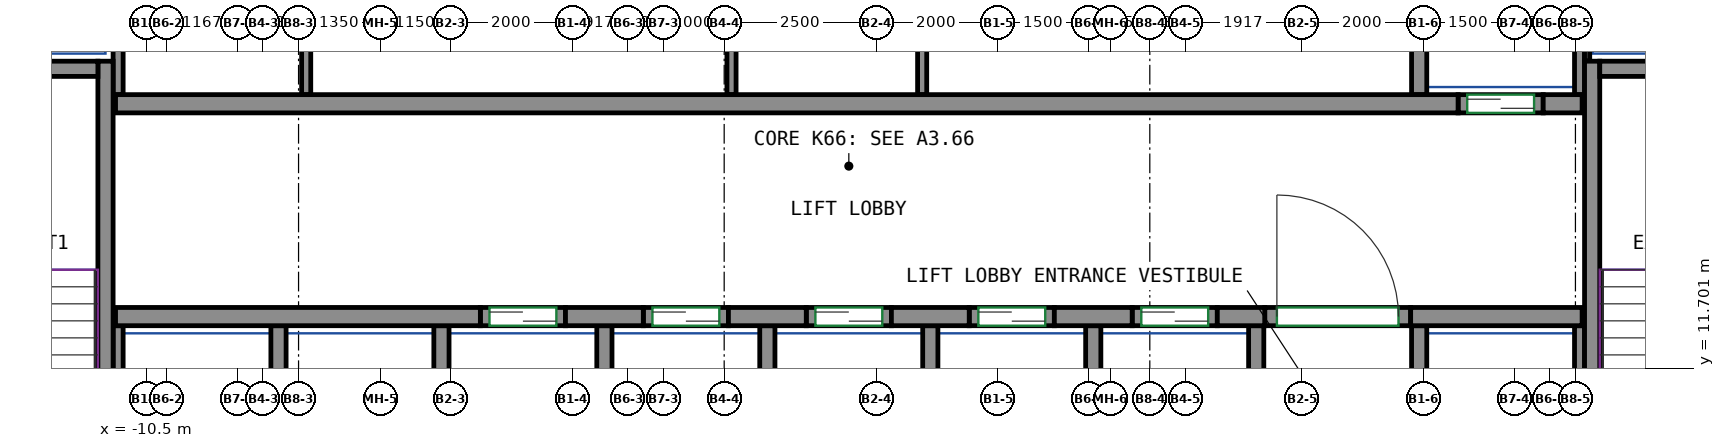
"""IFC4 building model, lengths in metres.
Left out: names, types, materials, properties, quantities, classifications, styles, units other than length and angle.
Written with IfcOpenShell. Run it as: python <this file> out.ifc"""

import sys

from ifc_helpers import new_model, si_unit, direction, frame, frame_2d, origin, place, context, subcontext, project, spatial, rectangle, extrude, source, transform, mapped, element, fill, save


model = new_model("IFC4")
c1 = context("Model", 3, precision=1e-05, world=origin(), true_north=direction((0.0, 1.0)))
c2 = subcontext(c1, "Body", "Model", "MODEL_VIEW")
j1 = project(units=[si_unit("LENGTHUNIT", "METRE"), si_unit("PLANEANGLEUNIT", "RADIAN")], contexts=[c1])
p1 = place(None, origin())
s1 = spatial("IfcSite", under=j1, at=p1, CompositionType="ELEMENT")
p2 = place(p1, origin())
s2 = spatial("IfcBuilding", under=s1, at=p2, CompositionType="ELEMENT")
p3 = place(p2, frame((0.0, 0.0, 267.0)))
s3 = spatial("IfcBuildingStorey", under=s2, at=p3, CompositionType="ELEMENT", Elevation=267.0)
m1 = source(origin(), c2, "Body", "SweptSolid", [
    extrude(rectangle(XDim=7.75, YDim=0.25, at=frame_2d((3.875, 0.0))), origin(), (0.0, 0.0, 1.0), 3.12),
])
p4 = place(p3, frame((-11.175, 9.0, 0.0), z_axis=(0.0, 0.0, 1.0), x_axis=(0.0, 1.0, 0.0)))
e1 = element("IfcWall", 1, at=p4, inside=s3, PredefinedType="SHEAR", context=c2, shape_type="MappedRepresentation", body=[
    mapped(m1, transform((0.0, 0.0, 0.0))),
])
m2 = source(origin(), c2, "Body", "SweptSolid", [
    extrude(rectangle(XDim=3.7, YDim=0.25, at=frame_2d((1.85, 0.0))), origin(), (0.0, 0.0, 1.0), 3.12),
])
p5 = place(p3, frame((-15.0, 16.625, 0.0), z_axis=(0.0, 0.0, 1.0), x_axis=(1.0, 0.0, 0.0)))
e2 = element("IfcWall", 2, at=p5, inside=s3, PredefinedType="SHEAR", context=c2, shape_type="MappedRepresentation", body=[
    mapped(m2, transform((0.0, 0.0, 0.0))),
])
p6 = place(p3, frame((13.275, 9.0, 0.0), z_axis=(0.0, 0.0, 1.0), x_axis=(0.0, 1.0, 0.0)))
e3 = element("IfcWall", 3, at=p6, inside=s3, PredefinedType="SHEAR", context=c2, shape_type="MappedRepresentation", body=[
    mapped(m1, transform((0.0, 0.0, 0.0))),
])
m3 = source(origin(), c2, "Body", "SweptSolid", [
    extrude(rectangle(XDim=3.7, YDim=0.25, at=frame_2d((1.85, 0.0))), origin(), (0.0, 0.0, 1.0), 3.12),
])
p7 = place(p3, frame((13.4, 16.625, 0.0), z_axis=(0.0, 0.0, 1.0), x_axis=(1.0, 0.0, 0.0)))
e4 = element("IfcWall", 4, at=p7, inside=s3, PredefinedType="SHEAR", context=c2, shape_type="MappedRepresentation", body=[
    mapped(m3, transform((0.0, 0.0, 0.0))),
])
m4 = source(origin(), c2, "Body", "SweptSolid", [
    extrude(rectangle(XDim=6.0, YDim=0.3, at=frame_2d((3.0, 0.0))), origin(), (0.0, 0.0, 1.0), 3.12),
])
p8 = place(p3, frame((-11.01, 12.55, 0.0), z_axis=(0.0, 0.0, 1.0), x_axis=(1.0, 0.0, 0.0)))
e5 = element("IfcWall", 5, at=p8, inside=s3, PredefinedType="SHEAR", context=c2, shape_type="MappedRepresentation", body=[
    mapped(m4, transform((0.0, 0.0, 0.0))),
])
m5 = source(origin(), c2, "Body", "SweptSolid", [
    extrude(rectangle(XDim=1.28, YDim=0.3, at=frame_2d((0.64, 0.0))), origin(), (0.0, 0.0, 1.0), 3.12),
])
for number, where, z_axis, x_axis in (
    (6, (-3.61, 12.55, 0.0), (0.0, 0.0, 1.0), (1.0, 0.0, 0.0)),
    (7, (-0.93, 12.55, 0.0), (0.0, 0.0, 1.0), (1.0, 0.0, 0.0)),
    (8, (1.75, 12.55, 0.0), (0.0, 0.0, 1.0), (1.0, 0.0, 0.0)),
    (9, (4.43, 12.55, 0.0), (0.0, 0.0, 1.0), (1.0, 0.0, 0.0)),
):
    element("IfcWall", number, at=place(p3, frame(where, z_axis=z_axis, x_axis=x_axis)), inside=s3, PredefinedType="SHEAR", context=c2, shape_type="MappedRepresentation", body=[
        mapped(m5, transform((0.0, 0.0, 0.0))),
    ])
m6 = source(origin(), c2, "Body", "SweptSolid", [
    extrude(rectangle(XDim=0.78, YDim=0.3, at=frame_2d((0.39, 0.0))), origin(), (0.0, 0.0, 1.0), 3.12),
])
p9 = place(p3, frame((7.11, 12.55, 0.0), z_axis=(0.0, 0.0, 1.0), x_axis=(1.0, 0.0, 0.0)))
e10 = element("IfcWall", 10, at=p9, inside=s3, PredefinedType="SHEAR", context=c2, shape_type="MappedRepresentation", body=[
    mapped(m6, transform((0.0, 0.0, 0.0))),
])
m7 = source(origin(), c2, "Body", "SweptSolid", [
    extrude(rectangle(XDim=2.82, YDim=0.3, at=frame_2d((1.41, 0.0))), origin(), (0.0, 0.0, 1.0), 3.12),
])
p10 = place(p3, frame((10.29, 12.55, 0.0), z_axis=(0.0, 0.0, 1.0), x_axis=(1.0, 0.0, 0.0)))
e11 = element("IfcWall", 11, at=p10, inside=s3, PredefinedType="SHEAR", context=c2, shape_type="MappedRepresentation", body=[
    mapped(m7, transform((0.0, 0.0, 0.0))),
])
m8 = source(origin(), c2, "Body", "SweptSolid", [
    extrude(rectangle(XDim=22.08, YDim=0.3, at=frame_2d((11.04, 0.0))), origin(), (0.0, 0.0, 1.0), 3.12),
])
p11 = place(p3, frame((-11.01, 16.05, 0.0), z_axis=(0.0, 0.0, 1.0), x_axis=(1.0, 0.0, 0.0)))
e12 = element("IfcWall", 12, at=p11, inside=s3, PredefinedType="SHEAR", context=c2, shape_type="MappedRepresentation", body=[
    mapped(m8, transform((0.0, 0.0, 0.0))),
])
m9 = source(origin(), c2, "Body", "SweptSolid", [
    extrude(rectangle(XDim=0.64, YDim=0.3, at=frame_2d((0.32, 0.0))), origin(), (0.0, 0.0, 1.0), 3.12),
])
p12 = place(p3, frame((12.47, 16.05, 0.0), z_axis=(0.0, 0.0, 1.0), x_axis=(1.0, 0.0, 0.0)))
e13 = element("IfcWall", 13, at=p12, inside=s3, PredefinedType="SHEAR", context=c2, shape_type="MappedRepresentation", body=[
    mapped(m9, transform((0.0, 0.0, 0.0))),
])
m10 = source(origin(), c2, "Body", "SweptSolid", [
    extrude(rectangle(XDim=1.4, YDim=0.3, at=frame_2d((0.7, 0.0))), origin(), (0.0, 0.0, 1.0), 3.12),
])
p13 = place(p3, frame((-5.01, 12.55, 0.0), z_axis=(0.0, 0.0, 1.0), x_axis=(1.0, 0.0, 0.0)))
e14 = element("IfcWall", 14, at=p13, inside=s3, PredefinedType="PARTITIONING", context=c2, shape_type="MappedRepresentation", body=[
    mapped(m10, transform((0.0, 0.0, 0.0))),
])
p14 = place(p13, frame((0.15, 0.0, 0.0)))
e15 = element("IfcOpeningElement", 15, at=p14, cuts=e14, PredefinedType="OPENING", context=c2, shape_type="SweptSolid", body=[
    extrude(rectangle(XDim=1.1, YDim=2.1, at=frame_2d((0.55, 1.05))), frame((0.0, 0.16, 0.0), z_axis=(0.0, -1.0, 0.0), x_axis=(1.0, 0.0, 0.0)), (0.0, 0.0, 1.0), 0.32),
])
m11 = source(origin(), c2, "Body", "SweptSolid", [
    extrude(rectangle(XDim=1.4, YDim=0.3, at=frame_2d((0.7, 0.0))), origin(), (0.0, 0.0, 1.0), 3.12),
])
p15 = place(p3, frame((-2.33, 12.55, 0.0), z_axis=(0.0, 0.0, 1.0), x_axis=(1.0, 0.0, 0.0)))
e16 = element("IfcWall", 16, at=p15, inside=s3, PredefinedType="PARTITIONING", context=c2, shape_type="MappedRepresentation", body=[
    mapped(m11, transform((0.0, 0.0, 0.0))),
])
p16 = place(p15, frame((0.15, 0.0, 0.0)))
e17 = element("IfcOpeningElement", 17, at=p16, cuts=e16, PredefinedType="OPENING", context=c2, shape_type="SweptSolid", body=[
    extrude(rectangle(XDim=1.1, YDim=2.1, at=frame_2d((0.55, 1.05))), frame((0.0, 0.16, 0.0), z_axis=(0.0, -1.0, 0.0), x_axis=(1.0, 0.0, 0.0)), (0.0, 0.0, 1.0), 0.32),
])
p17 = place(p3, frame((0.35, 12.55, 0.0), z_axis=(0.0, 0.0, 1.0), x_axis=(1.0, 0.0, 0.0)))
e18 = element("IfcWall", 18, at=p17, inside=s3, PredefinedType="PARTITIONING", context=c2, shape_type="MappedRepresentation", body=[
    mapped(m10, transform((0.0, 0.0, 0.0))),
])
p18 = place(p17, frame((0.15, 0.0, 0.0)))
e19 = element("IfcOpeningElement", 19, at=p18, cuts=e18, PredefinedType="OPENING", context=c2, shape_type="SweptSolid", body=[
    extrude(rectangle(XDim=1.1, YDim=2.1, at=frame_2d((0.55, 1.05))), frame((0.0, 0.16, 0.0), z_axis=(0.0, -1.0, 0.0), x_axis=(1.0, 0.0, 0.0)), (0.0, 0.0, 1.0), 0.32),
])
p19 = place(p3, frame((3.03, 12.55, 0.0), z_axis=(0.0, 0.0, 1.0), x_axis=(1.0, 0.0, 0.0)))
e20 = element("IfcWall", 20, at=p19, inside=s3, PredefinedType="PARTITIONING", context=c2, shape_type="MappedRepresentation", body=[
    mapped(m10, transform((0.0, 0.0, 0.0))),
])
p20 = place(p19, frame((0.15, 0.0, 0.0)))
e21 = element("IfcOpeningElement", 21, at=p20, cuts=e20, PredefinedType="OPENING", context=c2, shape_type="SweptSolid", body=[
    extrude(rectangle(XDim=1.1, YDim=2.1, at=frame_2d((0.55, 1.05))), frame((0.0, 0.16, 0.0), z_axis=(0.0, -1.0, 0.0), x_axis=(1.0, 0.0, 0.0)), (0.0, 0.0, 1.0), 0.32),
])
p21 = place(p3, frame((5.71, 12.55, 0.0), z_axis=(0.0, 0.0, 1.0), x_axis=(1.0, 0.0, 0.0)))
e22 = element("IfcWall", 22, at=p21, inside=s3, PredefinedType="PARTITIONING", context=c2, shape_type="MappedRepresentation", body=[
    mapped(m11, transform((0.0, 0.0, 0.0))),
])
p22 = place(p21, frame((0.15, 0.0, 0.0)))
e23 = element("IfcOpeningElement", 23, at=p22, cuts=e22, PredefinedType="OPENING", context=c2, shape_type="SweptSolid", body=[
    extrude(rectangle(XDim=1.1, YDim=2.1, at=frame_2d((0.55, 1.05))), frame((0.0, 0.16, 0.0), z_axis=(0.0, -1.0, 0.0), x_axis=(1.0, 0.0, 0.0)), (0.0, 0.0, 1.0), 0.32),
])
p23 = place(p3, frame((11.07, 16.05, 0.0), z_axis=(0.0, 0.0, 1.0), x_axis=(1.0, 0.0, 0.0)))
e24 = element("IfcWall", 24, at=p23, inside=s3, PredefinedType="PARTITIONING", context=c2, shape_type="MappedRepresentation", body=[
    mapped(m10, transform((0.0, 0.0, 0.0))),
])
p24 = place(p23, frame((0.15, 0.0, 0.0)))
e25 = element("IfcOpeningElement", 25, at=p24, cuts=e24, PredefinedType="OPENING", context=c2, shape_type="SweptSolid", body=[
    extrude(rectangle(XDim=1.1, YDim=2.1, at=frame_2d((0.55, 1.05))), frame((0.0, 0.16, 0.0), z_axis=(0.0, -1.0, 0.0), x_axis=(1.0, 0.0, 0.0)), (0.0, 0.0, 1.0), 0.32),
])
m12 = source(origin(), c2, "Body", "SweptSolid", [
    extrude(rectangle(XDim=2.4, YDim=0.3, at=frame_2d((1.2, 0.0))), origin(), (0.0, 0.0, 1.0), 3.12),
])
p25 = place(p3, frame((7.89, 12.55, 0.0), z_axis=(0.0, 0.0, 1.0), x_axis=(1.0, 0.0, 0.0)))
e26 = element("IfcWall", 26, at=p25, inside=s3, PredefinedType="PARTITIONING", context=c2, shape_type="MappedRepresentation", body=[
    mapped(m12, transform((0.0, 0.0, 0.0))),
])
p26 = place(p25, frame((0.2, 0.0, 0.0)))
e27 = element("IfcOpeningElement", 27, at=p26, cuts=e26, PredefinedType="OPENING", context=c2, shape_type="SweptSolid", body=[
    extrude(rectangle(XDim=2.0, YDim=2.1, at=frame_2d((1.0, 1.05))), frame((0.0, 0.16, 0.0), z_axis=(0.0, -1.0, 0.0), x_axis=(1.0, 0.0, 0.0)), (0.0, 0.0, 1.0), 0.32),
])
m13 = source(origin(), c2, "Body", "SweptSolid", [
    extrude(rectangle(XDim=3.275, YDim=0.165, at=frame_2d((1.638, 0.0))), origin(), (0.0, 0.0, 1.0), 3.12),
])
p27 = place(p3, frame((13.067, 16.2, 0.0), z_axis=(0.0, 0.0, 1.0), x_axis=(0.0, 1.0, 0.0)))
e28 = element("IfcWall", 28, at=p27, inside=s3, PredefinedType="PARTITIONING", context=c2, shape_type="MappedRepresentation", body=[
    mapped(m13, transform((0.0, 0.0, 0.0))),
])
m14 = source(origin(), c2, "Body", "SweptSolid", [
    extrude(rectangle(XDim=4.8, YDim=0.165, at=frame_2d((2.4, 0.0))), origin(), (0.0, 0.0, 1.0), 3.12),
])
p28 = place(p3, frame((-10.968, 16.2, 0.0), z_axis=(0.0, 0.0, 1.0), x_axis=(0.0, 1.0, 0.0)))
e29 = element("IfcWall", 29, at=p28, inside=s3, PredefinedType="PARTITIONING", context=c2, shape_type="MappedRepresentation", body=[
    mapped(m14, transform((0.0, 0.0, 0.0))),
])
m15 = source(origin(), c2, "Body", "SweptSolid", [
    extrude(rectangle(XDim=3.275, YDim=0.25, at=frame_2d((1.638, 0.0))), origin(), (0.0, 0.0, 1.0), 3.12),
])
p29 = place(p3, frame((10.43, 16.2, 0.0), z_axis=(0.0, 0.0, 1.0), x_axis=(0.0, 1.0, 0.0)))
e30 = element("IfcWall", 30, at=p29, inside=s3, PredefinedType="PARTITIONING", context=c2, shape_type="MappedRepresentation", body=[
    mapped(m15, transform((0.0, 0.0, 0.0))),
])
m16 = source(origin(), c2, "Body", "SweptSolid", [
    extrude(rectangle(XDim=2.725, YDim=0.085, at=frame_2d((1.363, 0.0))), origin(), (0.0, 0.0, 1.0), 3.12),
])
p30 = place(p3, frame((13.192, 16.75, 0.0), z_axis=(0.0, 0.0, 1.0), x_axis=(0.0, 1.0, 0.0)))
e31 = element("IfcWall", 31, at=p30, inside=s3, PredefinedType="PARTITIONING", context=c2, shape_type="MappedRepresentation", body=[
    mapped(m16, transform((0.0, 0.0, 0.0))),
])
m17 = source(origin(), c2, "Body", "SweptSolid", [
    extrude(rectangle(XDim=3.4, YDim=0.25, at=frame_2d((1.7, 0.0))), origin(), (0.0, 0.0, 1.0), 3.12),
])
p31 = place(p3, frame((10.43, 9.0, 0.0), z_axis=(0.0, 0.0, 1.0), x_axis=(0.0, 1.0, 0.0)))
e32 = element("IfcWall", 32, at=p31, inside=s3, PredefinedType="PARTITIONING", context=c2, shape_type="MappedRepresentation", body=[
    mapped(m17, transform((0.0, 0.0, 0.0))),
])
m18 = source(origin(), c2, "Body", "SweptSolid", [
    extrude(rectangle(XDim=3.4, YDim=0.165, at=frame_2d((1.7, 0.0))), origin(), (0.0, 0.0, 1.0), 3.12),
])
p32 = place(p3, frame((13.067, 9.0, 0.0), z_axis=(0.0, 0.0, 1.0), x_axis=(0.0, 1.0, 0.0)))
e33 = element("IfcWall", 33, at=p32, inside=s3, PredefinedType="PARTITIONING", context=c2, shape_type="MappedRepresentation", body=[
    mapped(m18, transform((0.0, 0.0, 0.0))),
])
for number, where, z_axis, x_axis in (
    (34, (2.39, 9.0, 0.0), (0.0, 0.0, 1.0), (0.0, 1.0, 0.0)),
    (35, (5.07, 9.0, 0.0), (0.0, 0.0, 1.0), (0.0, 1.0, 0.0)),
    (36, (7.75, 9.0, 0.0), (0.0, 0.0, 1.0), (0.0, 1.0, 0.0)),
    (37, (-0.29, 9.0, 0.0), (0.0, 0.0, 1.0), (0.0, 1.0, 0.0)),
):
    element("IfcWall", number, at=place(p3, frame(where, z_axis=z_axis, x_axis=x_axis)), inside=s3, PredefinedType="PARTITIONING", context=c2, shape_type="MappedRepresentation", body=[
        mapped(m17, transform((0.0, 0.0, 0.0))),
    ])
p33 = place(p3, frame((-10.968, 9.0, 0.0), z_axis=(0.0, 0.0, 1.0), x_axis=(0.0, 1.0, 0.0)))
e38 = element("IfcWall", 38, at=p33, inside=s3, PredefinedType="PARTITIONING", context=c2, shape_type="MappedRepresentation", body=[
    mapped(m18, transform((0.0, 0.0, 0.0))),
])
for number, where, z_axis, x_axis in (
    (39, (-2.97, 9.0, 0.0), (0.0, 0.0, 1.0), (0.0, 1.0, 0.0)),
    (40, (-5.65, 9.0, 0.0), (0.0, 0.0, 1.0), (0.0, 1.0, 0.0)),
    (41, (-8.33, 9.0, 0.0), (0.0, 0.0, 1.0), (0.0, 1.0, 0.0)),
):
    element("IfcWall", number, at=place(p3, frame(where, z_axis=z_axis, x_axis=x_axis)), inside=s3, PredefinedType="PARTITIONING", context=c2, shape_type="MappedRepresentation", body=[
        mapped(m17, transform((0.0, 0.0, 0.0))),
    ])
m19 = source(origin(), c2, "Body", "SweptSolid", [
    extrude(rectangle(XDim=4.8, YDim=0.15, at=frame_2d((2.4, 0.0))), origin(), (0.0, 0.0, 1.0), 3.12),
])
for number, where, z_axis, x_axis in (
    (42, (-7.875, 16.2, 0.0), (0.0, 0.0, 1.0), (0.0, 1.0, 0.0)),
    (43, (-0.88, 16.2, 0.0), (0.0, 0.0, 1.0), (0.0, 1.0, 0.0)),
    (44, (2.256, 16.2, 0.0), (0.0, 0.0, 1.0), (0.0, 1.0, 0.0)),
):
    element("IfcWall", number, at=place(p3, frame(where, z_axis=z_axis, x_axis=x_axis)), inside=s3, PredefinedType="PARTITIONING", context=c2, shape_type="MappedRepresentation", body=[
        mapped(m19, transform((0.0, 0.0, 0.0))),
    ])
p34 = place(p26, origin())
e45 = element("IfcDoor", 45, at=p34, inside=s3, OperationType="DOUBLE_DOOR_SINGLE_SWING", PredefinedType="DOOR", context=c2, shape_type="SweptSolid", body=[
    extrude(rectangle(XDim=2.0, YDim=2.1, at=frame_2d((1.0, 1.05))), frame((0.0, 0.025, 0.0), z_axis=(0.0, -1.0, 0.0), x_axis=(1.0, 0.0, 0.0)), (0.0, 0.0, 1.0), 0.05),
])
fill(e27, e45)
p35 = place(p14, origin())
e46 = element("IfcDoor", 46, at=p35, inside=s3, OperationType="DOUBLE_DOOR_SLIDING", PredefinedType="DOOR", context=c2, shape_type="SweptSolid", body=[
    extrude(rectangle(XDim=1.1, YDim=2.1, at=frame_2d((0.55, 1.05))), frame((0.0, 0.025, 0.0), z_axis=(0.0, -1.0, 0.0), x_axis=(1.0, 0.0, 0.0)), (0.0, 0.0, 1.0), 0.05),
])
fill(e15, e46)
p36 = place(p16, origin())
e47 = element("IfcDoor", 47, at=p36, inside=s3, OperationType="DOUBLE_DOOR_SLIDING", PredefinedType="DOOR", context=c2, shape_type="SweptSolid", body=[
    extrude(rectangle(XDim=1.1, YDim=2.1, at=frame_2d((0.55, 1.05))), frame((0.0, 0.025, 0.0), z_axis=(0.0, -1.0, 0.0), x_axis=(1.0, 0.0, 0.0)), (0.0, 0.0, 1.0), 0.05),
])
fill(e17, e47)
p37 = place(p18, origin())
e48 = element("IfcDoor", 48, at=p37, inside=s3, OperationType="DOUBLE_DOOR_SLIDING", PredefinedType="DOOR", context=c2, shape_type="SweptSolid", body=[
    extrude(rectangle(XDim=1.1, YDim=2.1, at=frame_2d((0.55, 1.05))), frame((0.0, 0.025, 0.0), z_axis=(0.0, -1.0, 0.0), x_axis=(1.0, 0.0, 0.0)), (0.0, 0.0, 1.0), 0.05),
])
fill(e19, e48)
p38 = place(p20, origin())
e49 = element("IfcDoor", 49, at=p38, inside=s3, OperationType="DOUBLE_DOOR_SLIDING", PredefinedType="DOOR", context=c2, shape_type="SweptSolid", body=[
    extrude(rectangle(XDim=1.1, YDim=2.1, at=frame_2d((0.55, 1.05))), frame((0.0, 0.025, 0.0), z_axis=(0.0, -1.0, 0.0), x_axis=(1.0, 0.0, 0.0)), (0.0, 0.0, 1.0), 0.05),
])
fill(e21, e49)
p39 = place(p22, origin())
e50 = element("IfcDoor", 50, at=p39, inside=s3, OperationType="DOUBLE_DOOR_SLIDING", PredefinedType="DOOR", context=c2, shape_type="SweptSolid", body=[
    extrude(rectangle(XDim=1.1, YDim=2.1, at=frame_2d((0.55, 1.05))), frame((0.0, 0.025, 0.0), z_axis=(0.0, -1.0, 0.0), x_axis=(1.0, 0.0, 0.0)), (0.0, 0.0, 1.0), 0.05),
])
fill(e23, e50)
p40 = place(p24, origin())
e51 = element("IfcDoor", 51, at=p40, inside=s3, OperationType="DOUBLE_DOOR_SLIDING", PredefinedType="DOOR", context=c2, shape_type="SweptSolid", body=[
    extrude(rectangle(XDim=1.1, YDim=2.1, at=frame_2d((0.55, 1.05))), frame((0.0, 0.025, 0.0), z_axis=(0.0, -1.0, 0.0), x_axis=(1.0, 0.0, 0.0)), (0.0, 0.0, 1.0), 0.05),
])
fill(e25, e51)
save(model, sys.argv[1])
